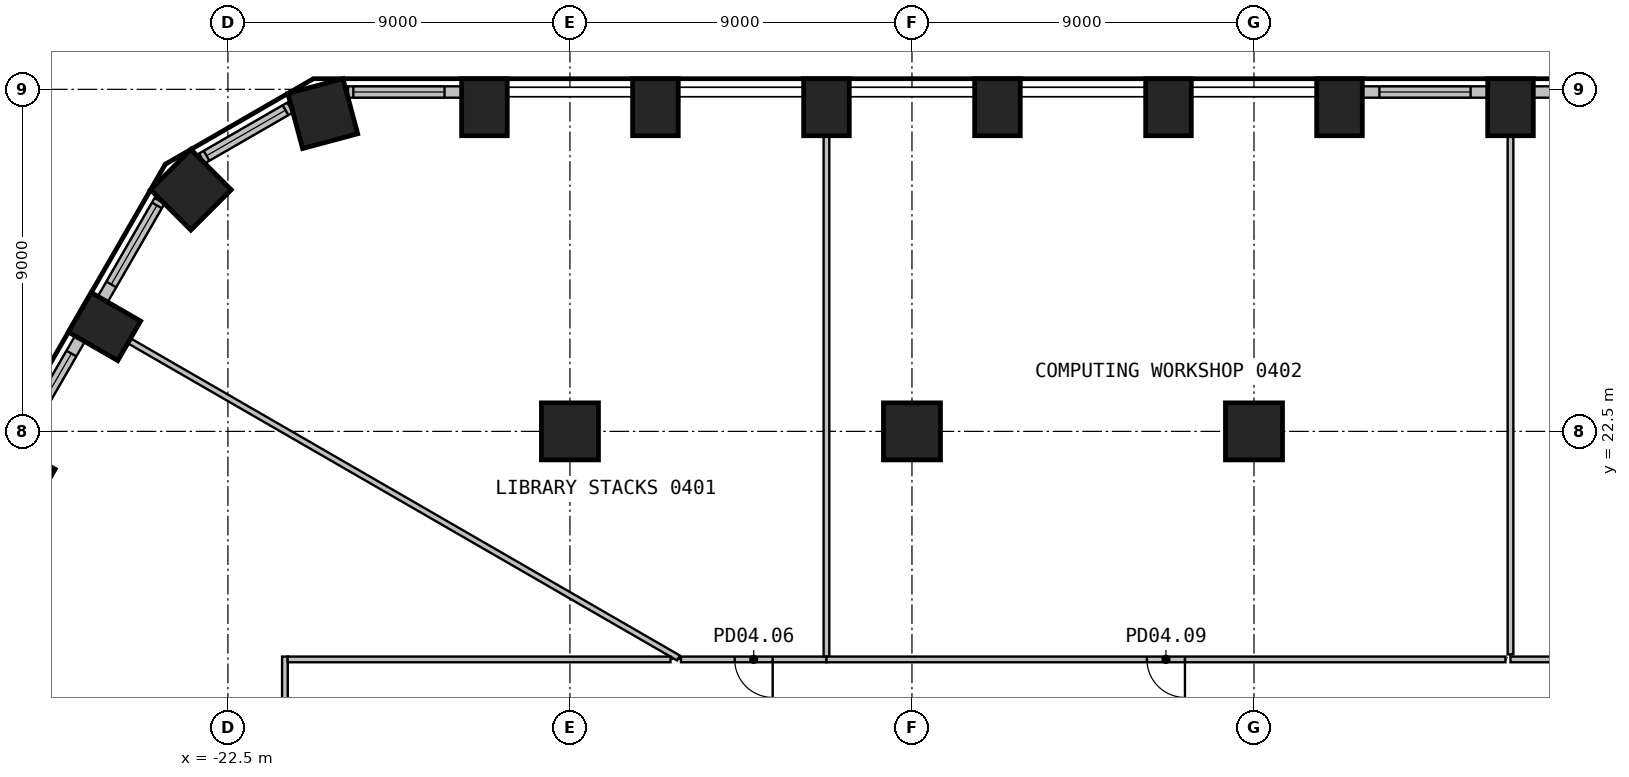
"""IFC4 building model, lengths in metres.
Left out: names, types, materials, properties, quantities, classifications, styles, units other than length and angle.
Written with IfcOpenShell. Run it as: python <this file> out.ifc"""

import sys

from ifc_helpers import new_model, si_unit, direction, frame, frame_2d, origin, origin_2d, place, context, subcontext, project, spatial, rectangle, circle, extrude, element, fill, save


model = new_model("IFC4")
c1 = context("Model", 3, precision=1e-05, world=origin(), true_north=direction((0.0, 1.0)))
c2 = subcontext(c1, "Body", "Model", "MODEL_VIEW")
j1 = project(units=[si_unit("LENGTHUNIT", "METRE"), si_unit("PLANEANGLEUNIT", "RADIAN")], contexts=[c1])
p1 = place(None, origin())
s1 = spatial("IfcSite", under=j1, at=p1, CompositionType="ELEMENT")
p2 = place(p1, origin())
s2 = spatial("IfcBuilding", under=s1, at=p2, CompositionType="ELEMENT")
p3 = place(p2, frame((0.0, 0.0, 20.4)))
s3 = spatial("IfcBuildingStorey", under=s2, at=p3, CompositionType="ELEMENT", Elevation=20.4)
for number, where, z_axis, x_axis in (
    (1, (11.25, 31.03, 0.0), (0.0, 0.0, 1.0), (-1.0, 0.0, 0.0)),
    (2, (6.75, 31.03, 0.0), (0.0, 0.0, 1.0), (-1.0, 0.0, 0.0)),
    (3, (2.25, 31.03, 0.0), (0.0, 0.0, 1.0), (-1.0, 0.0, 0.0)),
    (4, (-2.25, 31.03, 0.0), (0.0, 0.0, 1.0), (-1.0, 0.0, 0.0)),
    (5, (-6.75, 31.03, 0.0), (0.0, 0.0, 1.0), (-1.0, 0.0, 0.0)),
    (6, (-11.25, 31.03, 0.0), (0.0, 0.0, 1.0), (-1.0, 0.0, 0.0)),
    (7, (-15.75, 31.03, 0.0), (0.0, 0.0, 1.0), (-1.0, 0.0, 0.0)),
):
    element("IfcColumn", number, at=place(p3, frame(where, z_axis=z_axis, x_axis=x_axis)), inside=s3, PredefinedType="COLUMN", context=c2, shape_type="SweptSolid", body=[
        extrude(rectangle(XDim=1.2, YDim=1.5, at=origin_2d()), origin(), (0.0, 0.0, 1.0), 4.4),
    ])
for number, where, z_axis, x_axis in (
    (8, (-20.004, 30.861, 0.0), (0.0, 0.0, 1.0), (-0.966, -0.259, 0.0)),
    (9, (-23.475, 28.857, 0.0), (0.0, 0.0, 1.0), (-0.707, -0.707, 0.0)),
):
    element("IfcColumn", number, at=place(p3, frame(where, z_axis=z_axis, x_axis=x_axis)), inside=s3, PredefinedType="COLUMN", context=c2, shape_type="SweptSolid", body=[
        extrude(rectangle(XDim=1.5, YDim=1.5, at=origin_2d()), origin(), (0.0, 0.0, 1.0), 4.4),
    ])
for number, where, z_axis, x_axis in (
    (10, (-25.748, 25.258, 0.0), (0.0, 0.0, 1.0), (-0.5, -0.866, 0.0)),
    (11, (-27.998, 21.361, 0.0), (0.0, 0.0, 1.0), (-0.5, -0.866, 0.0)),
):
    element("IfcColumn", number, at=place(p3, frame(where, z_axis=z_axis, x_axis=x_axis)), inside=s3, PredefinedType="COLUMN", context=c2, shape_type="SweptSolid", body=[
        extrude(rectangle(XDim=1.2, YDim=1.5, at=origin_2d()), origin(), (0.0, 0.0, 1.0), 4.4),
    ])
for number, where, z_axis, x_axis in (
    (12, (-13.5, 22.5, 0.0), (0.0, 0.0, 1.0), (1.0, 0.0, 0.0)),
    (13, (-4.5, 22.5, 0.0), (0.0, 0.0, 1.0), (1.0, 0.0, 0.0)),
    (14, (4.5, 22.5, 0.0), (0.0, 0.0, 1.0), (1.0, 0.0, 0.0)),
):
    element("IfcColumn", number, at=place(p3, frame(where, z_axis=z_axis, x_axis=x_axis)), inside=s3, PredefinedType="COLUMN", context=c2, shape_type="SweptSolid", body=[
        extrude(circle(Radius=0.75, at=origin_2d()), origin(), (0.0, 0.0, 1.0), 4.4),
    ])
p4 = place(p3, frame((15.149, 31.43, 0.0), z_axis=(0.0, 0.0, 1.0), x_axis=(-1.0, 0.0, 0.0)))
e15 = element("IfcWall", 15, at=p4, inside=s3, PredefinedType="SOLIDWALL", context=c2, shape_type="SweptSolid", body=[
    extrude(rectangle(XDim=3.299, YDim=0.3, at=frame_2d((1.649, 0.0))), origin(), (0.0, 0.0, 1.0), 4.4),
])
p5 = place(p4, frame((0.449, 0.0, 0.9)))
e16 = element("IfcOpeningElement", 16, at=p5, cuts=e15, PredefinedType="OPENING", context=c2, shape_type="SweptSolid", body=[
    extrude(rectangle(XDim=2.4, YDim=3.0, at=frame_2d((1.2, 1.5))), frame((0.0, 0.16, 0.0), z_axis=(0.0, -1.0, 0.0), x_axis=(1.0, 0.0, 0.0)), (0.0, 0.0, 1.0), 0.32),
])
p6 = place(p3, frame((10.649, 31.43, 0.0), z_axis=(0.0, 0.0, 1.0), x_axis=(-1.0, 0.0, 0.0)))
e17 = element("IfcWall", 17, at=p6, inside=s3, PredefinedType="SOLIDWALL", context=c2, shape_type="SweptSolid", body=[
    extrude(rectangle(XDim=3.299, YDim=0.3, at=frame_2d((1.649, 0.0))), origin(), (0.0, 0.0, 1.0), 4.4),
])
p7 = place(p6, frame((0.449, 0.0, 0.9)))
e18 = element("IfcOpeningElement", 18, at=p7, cuts=e17, PredefinedType="OPENING", context=c2, shape_type="SweptSolid", body=[
    extrude(rectangle(XDim=2.4, YDim=3.0, at=frame_2d((1.2, 1.5))), frame((0.0, 0.16, 0.0), z_axis=(0.0, -1.0, 0.0), x_axis=(1.0, 0.0, 0.0)), (0.0, 0.0, 1.0), 0.32),
])
p8 = place(p3, frame((-16.351, 31.43, 0.0), z_axis=(0.0, 0.0, 1.0), x_axis=(-1.0, 0.0, 0.0)))
e19 = element("IfcWall", 19, at=p8, inside=s3, PredefinedType="SOLIDWALL", context=c2, shape_type="SweptSolid", body=[
    extrude(rectangle(XDim=2.989, YDim=0.3, at=frame_2d((1.494, 0.0))), origin(), (0.0, 0.0, 1.0), 4.4),
])
p9 = place(p8, frame((0.449, 0.0, 0.9)))
e20 = element("IfcOpeningElement", 20, at=p9, cuts=e19, PredefinedType="OPENING", context=c2, shape_type="SweptSolid", body=[
    extrude(rectangle(XDim=2.4, YDim=3.0, at=frame_2d((1.2, 1.5))), frame((0.0, 0.16, 0.0), z_axis=(0.0, -1.0, 0.0), x_axis=(1.0, 0.0, 0.0)), (0.0, 0.0, 1.0), 0.32),
])
p10 = place(p3, frame((-20.864, 31.021, 0.0), z_axis=(0.0, 0.0, 1.0), x_axis=(-0.866001915448, -0.500040680786, 0.0)))
e21 = element("IfcWall", 21, at=p10, inside=s3, PredefinedType="SOLIDWALL", context=c2, shape_type="SweptSolid", body=[
    extrude(rectangle(XDim=2.678, YDim=0.3, at=frame_2d((1.339, 0.0))), origin(), (0.0, 0.0, 1.0), 4.4),
])
p11 = place(p10, frame((0.139, 0.0, 0.9)))
e22 = element("IfcOpeningElement", 22, at=p11, cuts=e21, PredefinedType="OPENING", context=c2, shape_type="SweptSolid", body=[
    extrude(rectangle(XDim=2.4, YDim=3.0, at=frame_2d((1.2, 1.5))), frame((0.0, 0.16, 0.0), z_axis=(0.0, -1.0, 0.0), x_axis=(1.0, 0.0, 0.0)), (0.0, 0.0, 1.0), 0.32),
])
p12 = place(p3, frame((-24.299, 28.566, 0.0), z_axis=(0.0, 0.0, 1.0), x_axis=(-0.49999586137, -0.866027793211, 0.0)))
e23 = element("IfcWall", 23, at=p12, inside=s3, PredefinedType="SOLIDWALL", context=c2, shape_type="SweptSolid", body=[
    extrude(rectangle(XDim=2.989, YDim=0.3, at=frame_2d((1.494, 0.0))), origin(), (0.0, 0.0, 1.0), 4.4),
])
p13 = place(p12, frame((0.139, 0.0, 0.9)))
e24 = element("IfcOpeningElement", 24, at=p13, cuts=e23, PredefinedType="OPENING", context=c2, shape_type="SweptSolid", body=[
    extrude(rectangle(XDim=2.4, YDim=3.0, at=frame_2d((1.2, 1.5))), frame((0.0, 0.16, 0.0), z_axis=(0.0, -1.0, 0.0), x_axis=(1.0, 0.0, 0.0)), (0.0, 0.0, 1.0), 0.32),
])
p14 = place(p3, frame((-26.394, 24.938, 0.0), z_axis=(0.0, 0.0, 1.0), x_axis=(-0.499991515992, -0.866030301974, 0.0)))
e25 = element("IfcWall", 25, at=p14, inside=s3, PredefinedType="SOLIDWALL", context=c2, shape_type="SweptSolid", body=[
    extrude(rectangle(XDim=3.299, YDim=0.3, at=frame_2d((1.649, 0.0))), origin(), (0.0, 0.0, 1.0), 4.4),
])
p15 = place(p14, frame((0.449, 0.0, 0.9)))
e26 = element("IfcOpeningElement", 26, at=p15, cuts=e25, PredefinedType="OPENING", context=c2, shape_type="SweptSolid", body=[
    extrude(rectangle(XDim=2.4, YDim=3.0, at=frame_2d((1.2, 1.5))), frame((0.0, 0.16, 0.0), z_axis=(0.0, -1.0, 0.0), x_axis=(1.0, 0.0, 0.0)), (0.0, 0.0, 1.0), 0.32),
])
p16 = place(p3, frame((-25.081, 24.873, 0.0), z_axis=(0.0, 0.0, 1.0), x_axis=(0.866011934562, -0.500023328652, 0.0)))
e27 = element("IfcWall", 27, at=p16, inside=s3, PredefinedType="PARTITIONING", context=c2, shape_type="SweptSolid", body=[
    extrude(rectangle(XDim=16.67, YDim=0.15, at=frame_2d((8.335, 0.0))), origin(), (0.0, 0.0, 1.0), 4.4),
])
p17 = place(p3, frame((-21.0, 16.575, 0.0), z_axis=(0.0, 0.0, 1.0), x_axis=(0.0, -1.0, 0.0)))
e28 = element("IfcWall", 28, at=p17, inside=s3, PredefinedType="PARTITIONING", context=c2, shape_type="SweptSolid", body=[
    extrude(rectangle(XDim=14.25, YDim=0.15, at=frame_2d((7.125, 0.0))), origin(), (0.0, 0.0, 1.0), 4.4),
])
p18 = place(p17, frame((6.625, 0.0, 0.0)))
e29 = element("IfcOpeningElement", 29, at=p18, cuts=e28, PredefinedType="OPENING", context=c2, shape_type="SweptSolid", body=[
    extrude(rectangle(XDim=1.0, YDim=2.1, at=frame_2d((0.5, 1.05))), frame((0.0, 0.085, 0.0), z_axis=(0.0, -1.0, 0.0), x_axis=(1.0, 0.0, 0.0)), (0.0, 0.0, 1.0), 0.17),
])
p19 = place(p3, frame((-10.854, 16.5, 0.0), z_axis=(0.0, 0.0, 1.0), x_axis=(-1.0, 0.0, 0.0)))
e30 = element("IfcWall", 30, at=p19, inside=s3, PredefinedType="PARTITIONING", context=c2, shape_type="SweptSolid", body=[
    extrude(rectangle(XDim=10.071, YDim=0.15, at=frame_2d((5.036, 0.0))), origin(), (0.0, 0.0, 1.0), 4.4),
])
p20 = place(p3, frame((-6.75, 16.5, 0.0), z_axis=(0.0, 0.0, 1.0), x_axis=(-1.0, 0.0, 0.0)))
e31 = element("IfcWall", 31, at=p20, inside=s3, PredefinedType="PARTITIONING", context=c2, shape_type="SweptSolid", body=[
    extrude(rectangle(XDim=3.829, YDim=0.15, at=frame_2d((1.915, 0.0))), origin(), (0.0, 0.0, 1.0), 4.4),
])
p21 = place(p20, frame((1.415, 0.0, 0.0)))
e32 = element("IfcOpeningElement", 32, at=p21, cuts=e31, PredefinedType="OPENING", context=c2, shape_type="SweptSolid", body=[
    extrude(rectangle(XDim=1.0, YDim=2.1, at=frame_2d((0.5, 1.05))), frame((0.0, 0.085, 0.0), z_axis=(0.0, -1.0, 0.0), x_axis=(1.0, 0.0, 0.0)), (0.0, 0.0, 1.0), 0.17),
])
p22 = place(p3, frame((-6.75, 30.26, 0.0), z_axis=(0.0, 0.0, 1.0), x_axis=(0.0, -1.0, 0.0)))
e33 = element("IfcWall", 33, at=p22, inside=s3, PredefinedType="PARTITIONING", context=c2, shape_type="SweptSolid", body=[
    extrude(rectangle(XDim=13.685, YDim=0.15, at=frame_2d((6.842, 0.0))), origin(), (0.0, 0.0, 1.0), 4.4),
])
p23 = place(p3, frame((11.117, 16.5, 0.0), z_axis=(0.0, 0.0, 1.0), x_axis=(-1.0, 0.0, 0.0)))
e34 = element("IfcWall", 34, at=p23, inside=s3, PredefinedType="PARTITIONING", context=c2, shape_type="SweptSolid", body=[
    extrude(rectangle(XDim=17.867, YDim=0.15, at=frame_2d((8.934, 0.0))), origin(), (0.0, 0.0, 1.0), 4.4),
])
p24 = place(p23, frame((8.434, 0.0, 0.0)))
e35 = element("IfcOpeningElement", 35, at=p24, cuts=e34, PredefinedType="OPENING", context=c2, shape_type="SweptSolid", body=[
    extrude(rectangle(XDim=1.0, YDim=2.1, at=frame_2d((0.5, 1.05))), frame((0.0, 0.085, 0.0), z_axis=(0.0, -1.0, 0.0), x_axis=(1.0, 0.0, 0.0)), (0.0, 0.0, 1.0), 0.17),
])
p25 = place(p3, frame((21.075, 16.5, 0.0), z_axis=(0.0, 0.0, 1.0), x_axis=(-1.0, 0.0, 0.0)))
e36 = element("IfcWall", 36, at=p25, inside=s3, PredefinedType="PARTITIONING", context=c2, shape_type="SweptSolid", body=[
    extrude(rectangle(XDim=9.825, YDim=0.15, at=frame_2d((4.913, 0.0))), origin(), (0.0, 0.0, 1.0), 4.4),
])
p26 = place(p3, frame((11.25, 30.26, 0.0), z_axis=(0.0, 0.0, 1.0), x_axis=(0.0, -1.0, 0.0)))
e37 = element("IfcWall", 37, at=p26, inside=s3, PredefinedType="PARTITIONING", context=c2, shape_type="SweptSolid", body=[
    extrude(rectangle(XDim=13.627, YDim=0.15, at=frame_2d((6.813, 0.0))), origin(), (0.0, 0.0, 1.0), 4.4),
])
p27 = place(p7, origin())
e38 = element("IfcWindow", 38, at=p27, inside=s3, PartitioningType="SINGLE_PANEL", PredefinedType="WINDOW", context=c2, shape_type="SweptSolid", body=[
    extrude(rectangle(XDim=2.4, YDim=3.0, at=frame_2d((1.2, 1.5))), frame((0.0, 0.03, 0.0), z_axis=(0.0, -1.0, 0.0), x_axis=(1.0, 0.0, 0.0)), (0.0, 0.0, 1.0), 0.06),
])
fill(e18, e38)
p28 = place(p9, origin())
e39 = element("IfcWindow", 39, at=p28, inside=s3, PartitioningType="SINGLE_PANEL", PredefinedType="WINDOW", context=c2, shape_type="SweptSolid", body=[
    extrude(rectangle(XDim=2.4, YDim=3.0, at=frame_2d((1.2, 1.5))), frame((0.0, 0.03, 0.0), z_axis=(0.0, -1.0, 0.0), x_axis=(1.0, 0.0, 0.0)), (0.0, 0.0, 1.0), 0.06),
])
fill(e20, e39)
p29 = place(p11, origin())
e40 = element("IfcWindow", 40, at=p29, inside=s3, PartitioningType="SINGLE_PANEL", PredefinedType="WINDOW", context=c2, shape_type="SweptSolid", body=[
    extrude(rectangle(XDim=2.4, YDim=3.0, at=frame_2d((1.2, 1.5))), frame((0.0, 0.03, 0.0), z_axis=(0.0, -1.0, 0.0), x_axis=(1.0, 0.0, 0.0)), (0.0, 0.0, 1.0), 0.06),
])
fill(e22, e40)
p30 = place(p13, origin())
e41 = element("IfcWindow", 41, at=p30, inside=s3, PartitioningType="SINGLE_PANEL", PredefinedType="WINDOW", context=c2, shape_type="SweptSolid", body=[
    extrude(rectangle(XDim=2.4, YDim=3.0, at=frame_2d((1.2, 1.5))), frame((0.0, 0.03, 0.0), z_axis=(0.0, -1.0, 0.0), x_axis=(1.0, 0.0, 0.0)), (0.0, 0.0, 1.0), 0.06),
])
fill(e24, e41)
p31 = place(p15, origin())
e42 = element("IfcWindow", 42, at=p31, inside=s3, PartitioningType="SINGLE_PANEL", PredefinedType="WINDOW", context=c2, shape_type="SweptSolid", body=[
    extrude(rectangle(XDim=2.4, YDim=3.0, at=frame_2d((1.2, 1.5))), frame((0.0, 0.03, 0.0), z_axis=(0.0, -1.0, 0.0), x_axis=(1.0, 0.0, 0.0)), (0.0, 0.0, 1.0), 0.06),
])
fill(e26, e42)
p32 = place(p21, origin())
e43 = element("IfcDoor", 43, at=p32, inside=s3, OperationType="SINGLE_SWING_LEFT", PredefinedType="DOOR", context=c2, shape_type="SweptSolid", body=[
    extrude(rectangle(XDim=1.0, YDim=2.1, at=frame_2d((0.5, 1.05))), frame((0.0, 0.025, 0.0), z_axis=(0.0, -1.0, 0.0), x_axis=(1.0, 0.0, 0.0)), (0.0, 0.0, 1.0), 0.05),
])
fill(e32, e43)
p33 = place(p24, origin())
e44 = element("IfcDoor", 44, at=p33, inside=s3, OperationType="SINGLE_SWING_LEFT", PredefinedType="DOOR", context=c2, shape_type="SweptSolid", body=[
    extrude(rectangle(XDim=1.0, YDim=2.1, at=frame_2d((0.5, 1.05))), frame((0.0, 0.025, 0.0), z_axis=(0.0, -1.0, 0.0), x_axis=(1.0, 0.0, 0.0)), (0.0, 0.0, 1.0), 0.05),
])
fill(e35, e44)
save(model, sys.argv[1])
